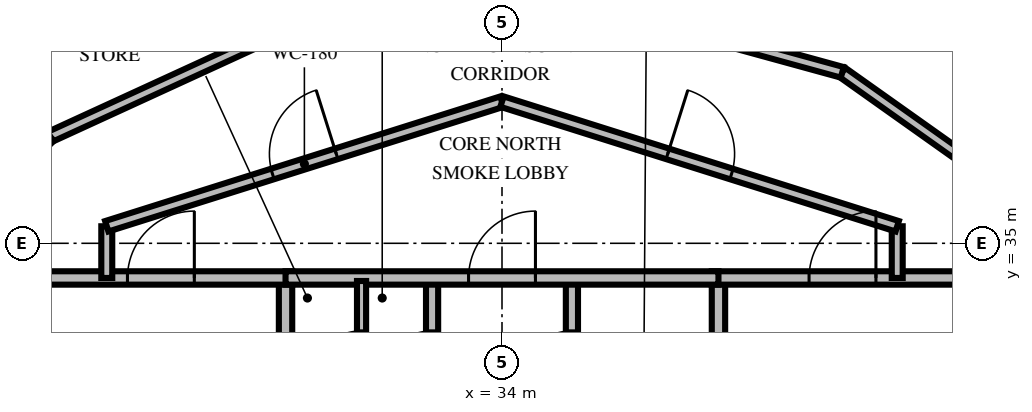
"""IFC4 building model, lengths in metres.
Left out: names, types, materials, properties, quantities, classifications, styles, units other than length and angle.
Written with IfcOpenShell. Run it as: python <this file> out.ifc"""

import sys

from ifc_helpers import new_model, si_unit, direction, frame, frame_2d, origin, place, context, subcontext, project, spatial, rectangle, extrude, element, fill, save


model = new_model("IFC4")
c1 = context("Model", 3, precision=1e-05, world=origin(), true_north=direction((0.0, 1.0)))
c2 = subcontext(c1, "Body", "Model", "MODEL_VIEW")
j1 = project(units=[si_unit("LENGTHUNIT", "METRE"), si_unit("PLANEANGLEUNIT", "RADIAN")], contexts=[c1])
p1 = place(None, origin())
s1 = spatial("IfcSite", under=j1, at=p1, CompositionType="ELEMENT")
p2 = place(p1, origin())
s2 = spatial("IfcBuilding", under=s1, at=p2, CompositionType="ELEMENT")
p3 = place(p2, frame((0.0, 0.0, 216.8)))
s3 = spatial("IfcBuildingStorey", under=s2, at=p3, CompositionType="ELEMENT", Elevation=216.8)
p4 = place(p3, frame((30.44, 30.05, 0.0), z_axis=(0.0, 0.0, 1.0), x_axis=(0.0, 1.0, 0.0)))
e1 = element("IfcWall", 1, at=p4, inside=s3, PredefinedType="SOLIDWALL", context=c2, shape_type="SweptSolid", body=[
    extrude(rectangle(XDim=4.38, YDim=0.22, at=frame_2d((2.19, 0.0))), origin(), (0.0, 0.0, 1.0), 2.45),
])
p5 = place(p4, frame((0.8, 0.0, 0.0)))
e2 = element("IfcOpeningElement", 2, at=p5, cuts=e1, PredefinedType="OPENING", context=c2, shape_type="SweptSolid", body=[
    extrude(rectangle(XDim=1.05, YDim=2.1, at=frame_2d((0.525, 1.05))), frame((0.0, 0.12, 0.0), z_axis=(0.0, -1.0, 0.0), x_axis=(1.0, 0.0, 0.0)), (0.0, 0.0, 1.0), 0.24),
])
p6 = place(p3, frame((26.24, 34.43, 0.0), z_axis=(0.0, 0.0, 1.0), x_axis=(1.0, 0.0, 0.0)))
e3 = element("IfcWall", 3, at=p6, inside=s3, PredefinedType="SOLIDWALL", context=c2, shape_type="SweptSolid", body=[
    extrude(rectangle(XDim=4.31, YDim=0.22, at=frame_2d((2.155, 0.0))), origin(), (0.0, 0.0, 1.0), 2.45),
])
p7 = place(p6, frame((1.6, 0.0, 0.0)))
e4 = element("IfcOpeningElement", 4, at=p7, cuts=e3, PredefinedType="OPENING", context=c2, shape_type="SweptSolid", body=[
    extrude(rectangle(XDim=1.1, YDim=2.15, at=frame_2d((0.55, 1.075))), frame((0.0, 0.12, 0.0), z_axis=(0.0, -1.0, 0.0), x_axis=(1.0, 0.0, 0.0)), (0.0, 0.0, 1.0), 0.24),
])
p8 = place(p3, frame((32.85, 30.05, 0.0), z_axis=(0.0, 0.0, 1.0), x_axis=(0.0, 1.0, 0.0)))
e5 = element("IfcWall", 5, at=p8, inside=s3, PredefinedType="SOLIDWALL", context=c2, shape_type="SweptSolid", body=[
    extrude(rectangle(XDim=4.38, YDim=0.2, at=frame_2d((2.19, 0.0))), origin(), (0.0, 0.0, 1.0), 2.45),
])
p9 = place(p8, frame((2.65, 0.0, 0.0)))
e6 = element("IfcOpeningElement", 6, at=p9, cuts=e5, PredefinedType="OPENING", context=c2, shape_type="SweptSolid", body=[
    extrude(rectangle(XDim=0.86, YDim=2.05, at=frame_2d((0.43, 1.025))), frame((0.0, 0.11, 0.0), z_axis=(0.0, -1.0, 0.0), x_axis=(1.0, 0.0, 0.0)), (0.0, 0.0, 1.0), 0.22),
])
p10 = place(p3, frame((37.56, 30.05, 0.0), z_axis=(0.0, 0.0, 1.0), x_axis=(0.0, 1.0, 0.0)))
e7 = element("IfcWall", 7, at=p10, inside=s3, PredefinedType="SOLIDWALL", context=c2, shape_type="SweptSolid", body=[
    extrude(rectangle(XDim=4.38, YDim=0.22, at=frame_2d((2.19, 0.0))), origin(), (0.0, 0.0, 1.0), 2.45),
])
p11 = place(p10, frame((0.8, 0.0, 0.0)))
e8 = element("IfcOpeningElement", 8, at=p11, cuts=e7, PredefinedType="OPENING", context=c2, shape_type="SweptSolid", body=[
    extrude(rectangle(XDim=1.05, YDim=2.1, at=frame_2d((0.525, 1.05))), frame((0.0, 0.12, 0.0), z_axis=(0.0, -1.0, 0.0), x_axis=(1.0, 0.0, 0.0)), (0.0, 0.0, 1.0), 0.24),
])
p12 = place(p3, frame((37.45, 34.43, 0.0), z_axis=(0.0, 0.0, 1.0), x_axis=(1.0, 0.0, 0.0)))
e9 = element("IfcWall", 9, at=p12, inside=s3, PredefinedType="SOLIDWALL", context=c2, shape_type="SweptSolid", body=[
    extrude(rectangle(XDim=4.31, YDim=0.22, at=frame_2d((2.155, 0.0))), origin(), (0.0, 0.0, 1.0), 2.45),
])
p13 = place(p12, frame((1.6, 0.0, 0.0)))
e10 = element("IfcOpeningElement", 10, at=p13, cuts=e9, PredefinedType="OPENING", context=c2, shape_type="SweptSolid", body=[
    extrude(rectangle(XDim=1.1, YDim=2.15, at=frame_2d((0.55, 1.075))), frame((0.0, 0.12, 0.0), z_axis=(0.0, -1.0, 0.0), x_axis=(1.0, 0.0, 0.0)), (0.0, 0.0, 1.0), 0.24),
])
p14 = place(p3, frame((35.15, 30.05, 0.0), z_axis=(0.0, 0.0, 1.0), x_axis=(0.0, 1.0, 0.0)))
e11 = element("IfcWall", 11, at=p14, inside=s3, PredefinedType="SOLIDWALL", context=c2, shape_type="SweptSolid", body=[
    extrude(rectangle(XDim=4.38, YDim=0.2, at=frame_2d((2.19, 0.0))), origin(), (0.0, 0.0, 1.0), 2.45),
])
p15 = place(p14, frame((2.65, 0.0, 0.0)))
e12 = element("IfcOpeningElement", 12, at=p15, cuts=e11, PredefinedType="OPENING", context=c2, shape_type="SweptSolid", body=[
    extrude(rectangle(XDim=0.86, YDim=2.05, at=frame_2d((0.43, 1.025))), frame((0.0, 0.11, 0.0), z_axis=(0.0, -1.0, 0.0), x_axis=(1.0, 0.0, 0.0)), (0.0, 0.0, 1.0), 0.22),
])
p16 = place(p3, frame((30.44, 34.43, 0.0), z_axis=(0.0, 0.0, 1.0), x_axis=(1.0, 0.0, 0.0)))
e13 = element("IfcWall", 13, at=p16, inside=s3, PredefinedType="SOLIDWALL", context=c2, shape_type="SweptSolid", body=[
    extrude(rectangle(XDim=7.12, YDim=0.22, at=frame_2d((3.56, 0.0))), origin(), (0.0, 0.0, 1.0), 2.45),
])
p17 = place(p16, frame((3.01, 0.0, 0.0)))
e14 = element("IfcOpeningElement", 14, at=p17, cuts=e13, PredefinedType="OPENING", context=c2, shape_type="SweptSolid", body=[
    extrude(rectangle(XDim=1.1, YDim=2.15, at=frame_2d((0.55, 1.075))), frame((0.0, 0.12, 0.0), z_axis=(0.0, -1.0, 0.0), x_axis=(1.0, 0.0, 0.0)), (0.0, 0.0, 1.0), 0.24),
])
p18 = place(p3, frame((31.69, 32.05, 0.0), z_axis=(0.0, 0.0, 1.0), x_axis=(0.0, 1.0, 0.0)))
e15 = element("IfcWall", 15, at=p18, inside=s3, PredefinedType="PARTITIONING", context=c2, shape_type="SweptSolid", body=[
    extrude(rectangle(XDim=2.33, YDim=0.15, at=frame_2d((1.165, 0.0))), origin(), (0.0, 0.0, 1.0), 2.45),
])
p19 = place(p18, frame((0.65, 0.0, 0.0)))
e16 = element("IfcOpeningElement", 16, at=p19, cuts=e15, PredefinedType="OPENING", context=c2, shape_type="SweptSolid", body=[
    extrude(rectangle(XDim=0.86, YDim=2.05, at=frame_2d((0.43, 1.025))), frame((0.0, 0.085, 0.0), z_axis=(0.0, -1.0, 0.0), x_axis=(1.0, 0.0, 0.0)), (0.0, 0.0, 1.0), 0.17),
])
for number, where, z_axis, x_axis in (
    (17, (27.5, 34.43, 0.0), (0.0, 0.0, 1.0), (0.0, 1.0, 0.0)),
    (18, (40.5, 35.28, 0.0), (0.0, 0.0, 1.0), (0.0, -1.0, 0.0)),
):
    element("IfcWall", number, at=place(p3, frame(where, z_axis=z_axis, x_axis=x_axis)), inside=s3, PredefinedType="PARTITIONING", context=c2, shape_type="SweptSolid", body=[
        extrude(rectangle(XDim=0.85, YDim=0.18, at=frame_2d((0.425, 0.0))), origin(), (0.0, 0.0, 1.0), 2.45),
    ])
p20 = place(p3, frame((27.5, 35.28, 0.0), z_axis=(0.0, 0.0, 1.0), x_axis=(0.953691418528, 0.300786765376, 0.0)))
e19 = element("IfcWall", 19, at=p20, inside=s3, PredefinedType="PARTITIONING", context=c2, shape_type="SweptSolid", body=[
    extrude(rectangle(XDim=6.816, YDim=0.18, at=frame_2d((3.408, 0.0))), origin(), (0.0, 0.0, 1.0), 2.45),
])
p21 = place(p20, frame((2.858, 0.0, 0.0)))
e20 = element("IfcOpeningElement", 20, at=p21, cuts=e19, PredefinedType="OPENING", context=c2, shape_type="SweptSolid", body=[
    extrude(rectangle(XDim=1.1, YDim=2.15, at=frame_2d((0.55, 1.075))), frame((0.0, 0.1, 0.0), z_axis=(0.0, -1.0, 0.0), x_axis=(1.0, 0.0, 0.0)), (0.0, 0.0, 1.0), 0.2),
])
p22 = place(p3, frame((34.0, 37.33, 0.0), z_axis=(0.0, 0.0, 1.0), x_axis=(0.953691418528, -0.300786765376, 0.0)))
e21 = element("IfcWall", 21, at=p22, inside=s3, PredefinedType="PARTITIONING", context=c2, shape_type="SweptSolid", body=[
    extrude(rectangle(XDim=6.816, YDim=0.18, at=frame_2d((3.408, 0.0))), origin(), (0.0, 0.0, 1.0), 2.45),
])
p23 = place(p22, frame((2.858, 0.0, 0.0)))
e22 = element("IfcOpeningElement", 22, at=p23, cuts=e21, PredefinedType="OPENING", context=c2, shape_type="SweptSolid", body=[
    extrude(rectangle(XDim=1.1, YDim=2.15, at=frame_2d((0.55, 1.075))), frame((0.0, 0.1, 0.0), z_axis=(0.0, -1.0, 0.0), x_axis=(1.0, 0.0, 0.0)), (0.0, 0.0, 1.0), 0.2),
])
p24 = place(p3, frame((43.298, 35.185, 0.0), z_axis=(0.0, 0.0, 1.0), x_axis=(-0.815622593255, 0.578584294094, 0.0)))
e23 = element("IfcWall", 23, at=p24, inside=s3, PredefinedType="PARTITIONING", context=c2, shape_type="SweptSolid", body=[
    extrude(rectangle(XDim=4.539, YDim=0.18, at=frame_2d((2.27, 0.0))), origin(), (0.0, 0.0, 1.0), 2.45),
])
p25 = place(p3, frame((39.596, 37.812, 0.0), z_axis=(0.0, 0.0, 1.0), x_axis=(-0.96432560951, 0.264718943113, 0.0)))
e24 = element("IfcWall", 24, at=p25, inside=s3, PredefinedType="PARTITIONING", context=c2, shape_type="SweptSolid", body=[
    extrude(rectangle(XDim=4.539, YDim=0.18, at=frame_2d((2.27, 0.0))), origin(), (0.0, 0.0, 1.0), 2.45),
])
p26 = place(p3, frame((30.694, 38.645, 0.0), z_axis=(0.0, 0.0, 1.0), x_axis=(-0.908879683918, -0.417058413368, 0.0)))
e25 = element("IfcWall", 25, at=p26, inside=s3, PredefinedType="PARTITIONING", context=c2, shape_type="SweptSolid", body=[
    extrude(rectangle(XDim=4.539, YDim=0.18, at=frame_2d((2.27, 0.0))), origin(), (0.0, 0.0, 1.0), 2.45),
])
p27 = place(p3, frame((26.569, 36.752, 0.0), z_axis=(0.0, 0.0, 1.0), x_axis=(-0.711423272881, -0.702763777384, 0.0)))
e26 = element("IfcWall", 26, at=p27, inside=s3, PredefinedType="PARTITIONING", context=c2, shape_type="SweptSolid", body=[
    extrude(rectangle(XDim=4.539, YDim=0.18, at=frame_2d((2.27, 0.0))), origin(), (0.0, 0.0, 1.0), 2.45),
])
p28 = place(p27, frame((1.77, 0.0, 0.0)))
e27 = element("IfcOpeningElement", 27, at=p28, cuts=e26, PredefinedType="OPENING", context=c2, shape_type="SweptSolid", body=[
    extrude(rectangle(XDim=1.0, YDim=2.15, at=frame_2d((0.5, 1.075))), frame((0.0, 0.1, 0.0), z_axis=(0.0, -1.0, 0.0), x_axis=(1.0, 0.0, 0.0)), (0.0, 0.0, 1.0), 0.2),
])
p29 = place(p7, origin())
e28 = element("IfcDoor", 28, at=p29, inside=s3, OperationType="SINGLE_SWING_RIGHT", PredefinedType="DOOR", context=c2, shape_type="SweptSolid", body=[
    extrude(rectangle(XDim=1.1, YDim=2.15, at=frame_2d((0.55, 1.075))), frame((0.0, 0.025, 0.0), z_axis=(0.0, -1.0, 0.0), x_axis=(1.0, 0.0, 0.0)), (0.0, 0.0, 1.0), 0.05),
])
fill(e4, e28)
p30 = place(p9, origin())
e29 = element("IfcDoor", 29, at=p30, inside=s3, OperationType="SINGLE_SWING_LEFT", PredefinedType="TRAPDOOR", context=c2, shape_type="SweptSolid", body=[
    extrude(rectangle(XDim=0.86, YDim=2.05, at=frame_2d((0.43, 1.025))), frame((0.0, 0.025, 0.0), z_axis=(0.0, -1.0, 0.0), x_axis=(1.0, 0.0, 0.0)), (0.0, 0.0, 1.0), 0.05),
])
fill(e6, e29)
p31 = place(p13, origin())
e30 = element("IfcDoor", 30, at=p31, inside=s3, OperationType="SINGLE_SWING_RIGHT", PredefinedType="DOOR", context=c2, shape_type="SweptSolid", body=[
    extrude(rectangle(XDim=1.1, YDim=2.15, at=frame_2d((0.55, 1.075))), frame((0.0, 0.025, 0.0), z_axis=(0.0, -1.0, 0.0), x_axis=(1.0, 0.0, 0.0)), (0.0, 0.0, 1.0), 0.05),
])
fill(e10, e30)
p32 = place(p15, origin())
e31 = element("IfcDoor", 31, at=p32, inside=s3, OperationType="SINGLE_SWING_LEFT", PredefinedType="TRAPDOOR", context=c2, shape_type="SweptSolid", body=[
    extrude(rectangle(XDim=0.86, YDim=2.05, at=frame_2d((0.43, 1.025))), frame((0.0, 0.025, 0.0), z_axis=(0.0, -1.0, 0.0), x_axis=(1.0, 0.0, 0.0)), (0.0, 0.0, 1.0), 0.05),
])
fill(e12, e31)
p33 = place(p17, origin())
e32 = element("IfcDoor", 32, at=p33, inside=s3, OperationType="SINGLE_SWING_RIGHT", PredefinedType="DOOR", context=c2, shape_type="SweptSolid", body=[
    extrude(rectangle(XDim=1.1, YDim=2.15, at=frame_2d((0.55, 1.075))), frame((0.0, 0.025, 0.0), z_axis=(0.0, -1.0, 0.0), x_axis=(1.0, 0.0, 0.0)), (0.0, 0.0, 1.0), 0.05),
])
fill(e14, e32)
p34 = place(p19, origin())
e33 = element("IfcDoor", 33, at=p34, inside=s3, OperationType="SINGLE_SWING_LEFT", PredefinedType="TRAPDOOR", context=c2, shape_type="SweptSolid", body=[
    extrude(rectangle(XDim=0.86, YDim=2.05, at=frame_2d((0.43, 1.025))), frame((0.0, 0.025, 0.0), z_axis=(0.0, -1.0, 0.0), x_axis=(1.0, 0.0, 0.0)), (0.0, 0.0, 1.0), 0.05),
])
fill(e16, e33)
p35 = place(p21, origin())
e34 = element("IfcDoor", 34, at=p35, inside=s3, OperationType="SINGLE_SWING_RIGHT", PredefinedType="DOOR", context=c2, shape_type="SweptSolid", body=[
    extrude(rectangle(XDim=1.1, YDim=2.15, at=frame_2d((0.55, 1.075))), frame((0.0, 0.025, 0.0), z_axis=(0.0, -1.0, 0.0), x_axis=(1.0, 0.0, 0.0)), (0.0, 0.0, 1.0), 0.05),
])
fill(e20, e34)
p36 = place(p23, origin())
e35 = element("IfcDoor", 35, at=p36, inside=s3, OperationType="SINGLE_SWING_LEFT", PredefinedType="DOOR", context=c2, shape_type="SweptSolid", body=[
    extrude(rectangle(XDim=1.1, YDim=2.15, at=frame_2d((0.55, 1.075))), frame((0.0, 0.025, 0.0), z_axis=(0.0, -1.0, 0.0), x_axis=(1.0, 0.0, 0.0)), (0.0, 0.0, 1.0), 0.05),
])
fill(e22, e35)
save(model, sys.argv[1])
